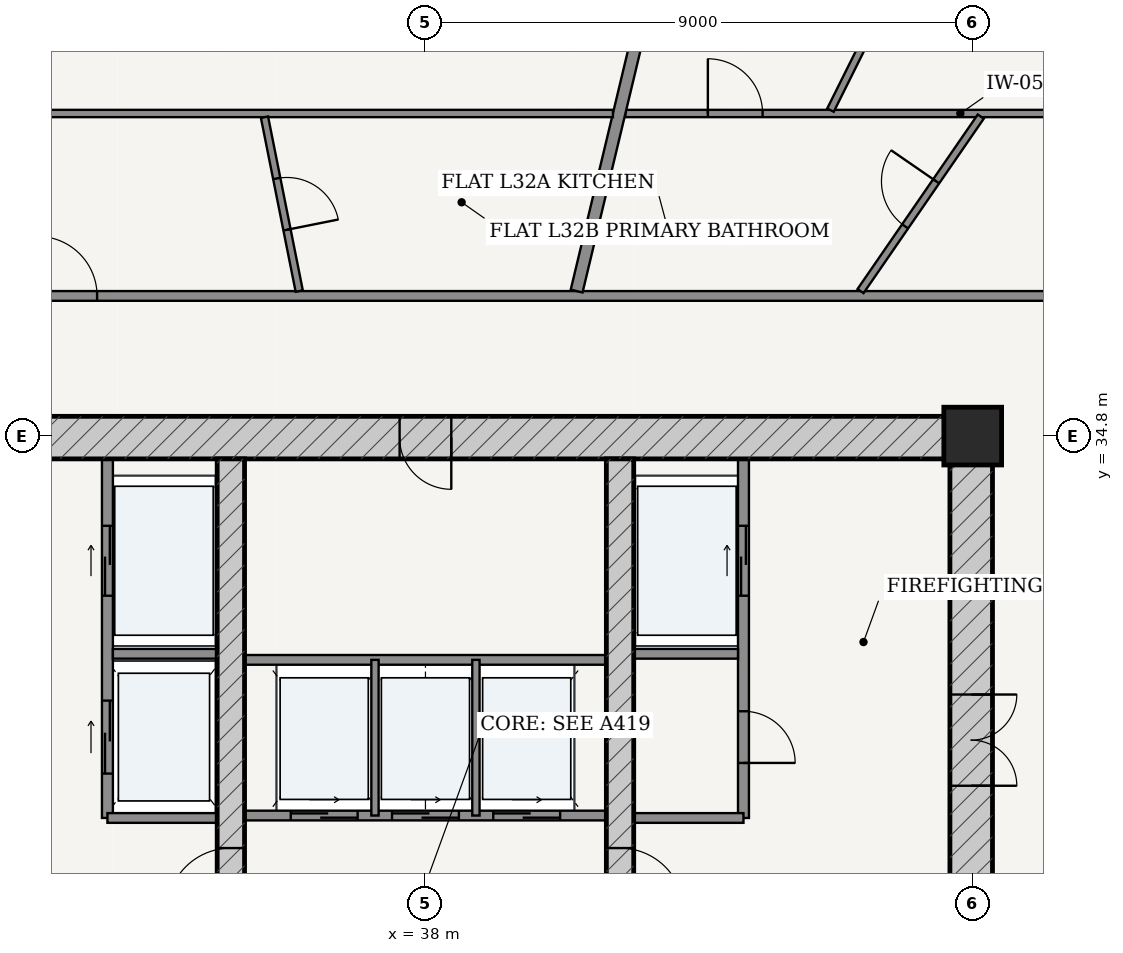
"""IFC4 building model, lengths in metres.
Left out: names, types, materials, properties, quantities, classifications, styles, units other than length and angle.
Written with IfcOpenShell. Run it as: python <this file> out.ifc"""

import sys

from ifc_helpers import new_model, si_unit, direction, frame, frame_2d, origin, origin_2d, place, context, subcontext, project, spatial, rectangle, extrude, source, transform, mapped, element, fill, save


model = new_model("IFC4")
c1 = context("Model", 3, precision=1e-05, world=origin(), true_north=direction((-0.2419218956, 0.970295726276)))
c2 = subcontext(c1, "Body", "Model", "MODEL_VIEW")
j1 = project(units=[si_unit("LENGTHUNIT", "METRE"), si_unit("PLANEANGLEUNIT", "RADIAN")], contexts=[c1])
p1 = place(None, origin())
s1 = spatial("IfcSite", under=j1, at=p1, CompositionType="ELEMENT")
p2 = place(p1, origin())
s2 = spatial("IfcBuilding", under=s1, at=p2, CompositionType="ELEMENT")
p3 = place(p2, frame((0.0, 0.0, 123.0)))
s3 = spatial("IfcBuildingStorey", under=s2, at=p3, CompositionType="ELEMENT", Elevation=123.0)
p4 = place(p3, frame((47.0, 34.8, 0.0), z_axis=(0.0, 0.0, 1.0), x_axis=(1.0, 0.0, 0.0)))
e1 = element("IfcColumn", 1, at=p4, inside=s3, PredefinedType="COLUMN", context=c2, shape_type="SweptSolid", body=[
    extrude(rectangle(XDim=0.95, YDim=0.95, at=origin_2d()), origin(), (0.0, 0.0, 1.0), 3.6),
])
p5 = place(p3, frame((28.675, 34.775, 0.0), z_axis=(0.0, 0.0, 1.0), x_axis=(1.0, 0.0, 0.0)))
e2 = element("IfcWall", 2, at=p5, inside=s3, PredefinedType="SHEAR", context=c2, shape_type="SweptSolid", body=[
    extrude(rectangle(XDim=18.65, YDim=0.7, at=frame_2d((9.325, 0.0))), origin(), (0.0, 0.0, 1.0), 3.325),
])
p6 = place(p5, frame((8.9, 0.0, 0.0)))
e3 = element("IfcOpeningElement", 3, at=p6, cuts=e2, PredefinedType="OPENING", context=c2, shape_type="SweptSolid", body=[
    extrude(rectangle(XDim=0.85, YDim=2.1, at=frame_2d((0.425, 1.05))), frame((0.0, 0.36, 0.0), z_axis=(0.0, -1.0, 0.0), x_axis=(1.0, 0.0, 0.0)), (0.0, 0.0, 1.0), 0.72),
])
p7 = place(p3, frame((46.975, 19.175, 0.0), z_axis=(0.0, 0.0, 1.0), x_axis=(0.0, 1.0, 0.0)))
e4 = element("IfcWall", 4, at=p7, inside=s3, PredefinedType="SHEAR", context=c2, shape_type="SweptSolid", body=[
    extrude(rectangle(XDim=15.25, YDim=0.7, at=frame_2d((7.625, 0.0))), origin(), (0.0, 0.0, 1.0), 3.325),
])
p8 = place(p7, frame((9.875, 0.0, 0.0)))
e5 = element("IfcOpeningElement", 5, at=p8, cuts=e4, PredefinedType="OPENING", context=c2, shape_type="SweptSolid", body=[
    extrude(rectangle(XDim=1.5, YDim=2.2, at=frame_2d((0.75, 1.1))), frame((0.0, 0.36, 0.0), z_axis=(0.0, -1.0, 0.0), x_axis=(1.0, 0.0, 0.0)), (0.0, 0.0, 1.0), 0.72),
])
p9 = place(p3, frame((34.8, 19.175, 0.0), z_axis=(0.0, 0.0, 1.0), x_axis=(0.0, 1.0, 0.0)))
e6 = element("IfcWall", 6, at=p9, inside=s3, PredefinedType="SHEAR", context=c2, shape_type="SweptSolid", body=[
    extrude(rectangle(XDim=15.25, YDim=0.45, at=frame_2d((7.625, 0.0))), origin(), (0.0, 0.0, 1.0), 3.325),
])
p10 = place(p9, frame((7.8, 0.0, 0.0)))
e7 = element("IfcOpeningElement", 7, at=p10, cuts=e6, PredefinedType="OPENING", context=c2, shape_type="SweptSolid", body=[
    extrude(rectangle(XDim=1.05, YDim=2.15, at=frame_2d((0.525, 1.075))), frame((0.0, 0.235, 0.0), z_axis=(0.0, -1.0, 0.0), x_axis=(1.0, 0.0, 0.0)), (0.0, 0.0, 1.0), 0.47),
])
p11 = place(p3, frame((41.2, 19.175, 0.0), z_axis=(0.0, 0.0, 1.0), x_axis=(0.0, 1.0, 0.0)))
e8 = element("IfcWall", 8, at=p11, inside=s3, PredefinedType="SHEAR", context=c2, shape_type="SweptSolid", body=[
    extrude(rectangle(XDim=15.25, YDim=0.45, at=frame_2d((7.625, 0.0))), origin(), (0.0, 0.0, 1.0), 3.325),
])
p12 = place(p11, frame((7.8, 0.0, 0.0)))
e9 = element("IfcOpeningElement", 9, at=p12, cuts=e8, PredefinedType="OPENING", context=c2, shape_type="SweptSolid", body=[
    extrude(rectangle(XDim=1.05, YDim=2.15, at=frame_2d((0.525, 1.075))), frame((0.0, 0.235, 0.0), z_axis=(0.0, -1.0, 0.0), x_axis=(1.0, 0.0, 0.0)), (0.0, 0.0, 1.0), 0.47),
])
p13 = place(p3, frame((32.77, 28.52, 0.0), z_axis=(0.0, 0.0, 1.0), x_axis=(0.0, 1.0, 0.0)))
e10 = element("IfcWall", 10, at=p13, inside=s3, PredefinedType="PARTITIONING", context=c2, shape_type="SweptSolid", body=[
    extrude(rectangle(XDim=5.905, YDim=0.18, at=frame_2d((2.953, 0.0))), origin(), (0.0, 0.0, 1.0), 3.325),
])
p14 = place(p13, frame((3.655, 0.0, 0.0)))
e11 = element("IfcOpeningElement", 11, at=p14, cuts=e10, PredefinedType="OPENING", context=c2, shape_type="SweptSolid", body=[
    extrude(rectangle(XDim=1.15, YDim=2.2, at=frame_2d((0.575, 1.1))), frame((0.0, 0.1, 0.0), z_axis=(0.0, -1.0, 0.0), x_axis=(1.0, 0.0, 0.0)), (0.0, 0.0, 1.0), 0.2),
])
p15 = place(p13, frame((0.73, 0.0, 0.0)))
e12 = element("IfcOpeningElement", 12, at=p15, cuts=e10, PredefinedType="OPENING", context=c2, shape_type="SweptSolid", body=[
    extrude(rectangle(XDim=1.2, YDim=2.25, at=frame_2d((0.6, 1.125))), frame((0.0, 0.1, 0.0), z_axis=(0.0, -1.0, 0.0), x_axis=(1.0, 0.0, 0.0)), (0.0, 0.0, 1.0), 0.2),
])
p16 = place(p3, frame((32.86, 31.22, 0.0), z_axis=(0.0, 0.0, 1.0), x_axis=(1.0, 0.0, 0.0)))
e13 = element("IfcWall", 13, at=p16, inside=s3, PredefinedType="PARTITIONING", context=c2, shape_type="SweptSolid", body=[
    extrude(rectangle(XDim=1.715, YDim=0.16, at=frame_2d((0.857, 0.0))), origin(), (0.0, 0.0, 1.0), 3.325),
])
p17 = place(p3, frame((32.77, 28.52, 0.0), z_axis=(0.0, 0.0, 1.0), x_axis=(1.0, 0.0, 0.0)))
e14 = element("IfcWall", 14, at=p17, inside=s3, PredefinedType="PARTITIONING", context=c2, shape_type="SweptSolid", body=[
    extrude(rectangle(XDim=1.805, YDim=0.16, at=frame_2d((0.902, 0.0))), origin(), (0.0, 0.0, 1.0), 3.325),
])
p18 = place(p3, frame((43.23, 28.52, 0.0), z_axis=(0.0, 0.0, 1.0), x_axis=(0.0, 1.0, 0.0)))
e15 = element("IfcWall", 15, at=p18, inside=s3, PredefinedType="PARTITIONING", context=c2, shape_type="SweptSolid", body=[
    extrude(rectangle(XDim=5.905, YDim=0.18, at=frame_2d((2.953, 0.0))), origin(), (0.0, 0.0, 1.0), 3.325),
])
p19 = place(p18, frame((0.905, 0.0, 0.0)))
e16 = element("IfcOpeningElement", 16, at=p19, cuts=e15, PredefinedType="OPENING", context=c2, shape_type="SweptSolid", body=[
    extrude(rectangle(XDim=0.85, YDim=2.1, at=frame_2d((0.425, 1.05))), frame((0.0, 0.1, 0.0), z_axis=(0.0, -1.0, 0.0), x_axis=(1.0, 0.0, 0.0)), (0.0, 0.0, 1.0), 0.2),
])
p20 = place(p18, frame((3.655, 0.0, 0.0)))
e17 = element("IfcOpeningElement", 17, at=p20, cuts=e15, PredefinedType="OPENING", context=c2, shape_type="SweptSolid", body=[
    extrude(rectangle(XDim=1.15, YDim=2.2, at=frame_2d((0.575, 1.1))), frame((0.0, 0.1, 0.0), z_axis=(0.0, -1.0, 0.0), x_axis=(1.0, 0.0, 0.0)), (0.0, 0.0, 1.0), 0.2),
])
p21 = place(p3, frame((41.425, 31.22, 0.0), z_axis=(0.0, 0.0, 1.0), x_axis=(1.0, 0.0, 0.0)))
e18 = element("IfcWall", 18, at=p21, inside=s3, PredefinedType="PARTITIONING", context=c2, shape_type="SweptSolid", body=[
    extrude(rectangle(XDim=1.715, YDim=0.16, at=frame_2d((0.857, 0.0))), origin(), (0.0, 0.0, 1.0), 3.325),
])
p22 = place(p3, frame((41.425, 28.52, 0.0), z_axis=(0.0, 0.0, 1.0), x_axis=(1.0, 0.0, 0.0)))
e19 = element("IfcWall", 19, at=p22, inside=s3, PredefinedType="PARTITIONING", context=c2, shape_type="SweptSolid", body=[
    extrude(rectangle(XDim=1.805, YDim=0.16, at=frame_2d((0.902, 0.0))), origin(), (0.0, 0.0, 1.0), 3.325),
])
p23 = place(p3, frame((35.025, 28.56, 0.0), z_axis=(0.0, 0.0, 1.0), x_axis=(1.0, 0.0, 0.0)))
e20 = element("IfcWall", 20, at=p23, inside=s3, PredefinedType="PARTITIONING", context=c2, shape_type="SweptSolid", body=[
    extrude(rectangle(XDim=5.95, YDim=0.16, at=frame_2d((2.975, 0.0))), origin(), (0.0, 0.0, 1.0), 3.325),
])
p24 = place(p23, frame((0.76, 0.0, 0.0)))
e21 = element("IfcOpeningElement", 21, at=p24, cuts=e20, PredefinedType="OPENING", context=c2, shape_type="SweptSolid", body=[
    extrude(rectangle(XDim=1.1, YDim=2.2, at=frame_2d((0.55, 1.1))), frame((0.0, 0.09, 0.0), z_axis=(0.0, -1.0, 0.0), x_axis=(1.0, 0.0, 0.0)), (0.0, 0.0, 1.0), 0.18),
])
p25 = place(p23, frame((2.425, 0.0, 0.0)))
e22 = element("IfcOpeningElement", 22, at=p25, cuts=e20, PredefinedType="OPENING", context=c2, shape_type="SweptSolid", body=[
    extrude(rectangle(XDim=1.1, YDim=2.2, at=frame_2d((0.55, 1.1))), frame((0.0, 0.09, 0.0), z_axis=(0.0, -1.0, 0.0), x_axis=(1.0, 0.0, 0.0)), (0.0, 0.0, 1.0), 0.18),
])
p26 = place(p23, frame((4.09, 0.0, 0.0)))
e23 = element("IfcOpeningElement", 23, at=p26, cuts=e20, PredefinedType="OPENING", context=c2, shape_type="SweptSolid", body=[
    extrude(rectangle(XDim=1.1, YDim=2.2, at=frame_2d((0.55, 1.1))), frame((0.0, 0.09, 0.0), z_axis=(0.0, -1.0, 0.0), x_axis=(1.0, 0.0, 0.0)), (0.0, 0.0, 1.0), 0.18),
])
p27 = place(p3, frame((35.025, 31.12, 0.0), z_axis=(0.0, 0.0, 1.0), x_axis=(1.0, 0.0, 0.0)))
e24 = element("IfcWall", 24, at=p27, inside=s3, PredefinedType="PARTITIONING", context=c2, shape_type="SweptSolid", body=[
    extrude(rectangle(XDim=5.95, YDim=0.16, at=frame_2d((2.975, 0.0))), origin(), (0.0, 0.0, 1.0), 3.325),
])
for number, where, z_axis, x_axis in (
    (25, (37.17, 28.56, 0.0), (0.0, 0.0, 1.0), (0.0, 1.0, 0.0)),
    (26, (38.83, 28.56, 0.0), (0.0, 0.0, 1.0), (0.0, 1.0, 0.0)),
):
    element("IfcWall", number, at=place(p3, frame(where, z_axis=z_axis, x_axis=x_axis)), inside=s3, PredefinedType="PARTITIONING", context=c2, shape_type="SweptSolid", body=[
        extrude(rectangle(XDim=2.56, YDim=0.12, at=frame_2d((1.28, 0.0))), origin(), (0.0, 0.0, 1.0), 3.325),
    ])
p28 = place(p3, frame((26.695, 37.105, 0.0), z_axis=(0.0, 0.0, 1.0), x_axis=(1.0, 0.0, 0.0)))
e27 = element("IfcWall", 27, at=p28, inside=s3, PredefinedType="PARTITIONING", context=c2, shape_type="SweptSolid", body=[
    extrude(rectangle(XDim=22.61, YDim=0.16, at=frame_2d((11.305, 0.0))), origin(), (0.0, 0.0, 1.0), 2.767),
])
p29 = place(p28, frame((4.925, 0.0, 0.0)))
e28 = element("IfcOpeningElement", 28, at=p29, cuts=e27, PredefinedType="OPENING", context=c2, shape_type="SweptSolid", body=[
    extrude(rectangle(XDim=0.98, YDim=2.2, at=frame_2d((0.49, 1.1))), frame((0.0, 0.09, 0.0), z_axis=(0.0, -1.0, 0.0), x_axis=(1.0, 0.0, 0.0)), (0.0, 0.0, 1.0), 0.18),
])
p30 = place(p3, frame((41.287, 40.105, 0.0), z_axis=(0.0, 0.0, 1.0), x_axis=(1.0, 0.0, 0.0)))
e29 = element("IfcWall", 29, at=p30, inside=s3, PredefinedType="PARTITIONING", context=c2, shape_type="SweptSolid", body=[
    extrude(rectangle(XDim=11.018, YDim=0.12, at=frame_2d((5.509, 0.0))), origin(), (0.0, 0.0, 1.0), 2.767),
])
p31 = place(p30, frame((1.357, 0.0, 0.0)))
e30 = element("IfcOpeningElement", 30, at=p31, cuts=e29, PredefinedType="OPENING", context=c2, shape_type="SweptSolid", body=[
    extrude(rectangle(XDim=0.9, YDim=2.15, at=frame_2d((0.45, 1.075))), frame((0.0, 0.07, 0.0), z_axis=(0.0, -1.0, 0.0), x_axis=(1.0, 0.0, 0.0)), (0.0, 0.0, 1.0), 0.14),
])
p32 = place(p3, frame((44.661, 40.16, 0.0), z_axis=(0.0, 0.0, 1.0), x_axis=(0.446177198157, 0.894944639542, 0.0)))
e31 = element("IfcWall", 31, at=p32, inside=s3, PredefinedType="PARTITIONING", context=c2, shape_type="SweptSolid", body=[
    extrude(rectangle(XDim=7.823, YDim=0.12, at=frame_2d((3.912, 0.0))), origin(), (0.0, 0.0, 1.0), 2.767),
])
p33 = place(p32, frame((3.461, 0.0, 0.0)))
e32 = element("IfcOpeningElement", 32, at=p33, cuts=e31, PredefinedType="OPENING", context=c2, shape_type="SweptSolid", body=[
    extrude(rectangle(XDim=0.9, YDim=2.15, at=frame_2d((0.45, 1.075))), frame((0.0, 0.07, 0.0), z_axis=(0.0, -1.0, 0.0), x_axis=(1.0, 0.0, 0.0)), (0.0, 0.0, 1.0), 0.14),
])
p34 = place(p3, frame((45.155, 37.185, 0.0), z_axis=(0.0, 0.0, 1.0), x_axis=(0.567393940912, 0.82344648631, 0.0)))
e33 = element("IfcWall", 33, at=p34, inside=s3, PredefinedType="PARTITIONING", context=c2, shape_type="SweptSolid", body=[
    extrude(rectangle(XDim=3.484, YDim=0.12, at=frame_2d((1.742, 0.0))), origin(), (0.0, 0.0, 1.0), 3.004),
])
p35 = place(p34, frame((1.292, 0.0, 0.0)))
e34 = element("IfcOpeningElement", 34, at=p35, cuts=e33, PredefinedType="OPENING", context=c2, shape_type="SweptSolid", body=[
    extrude(rectangle(XDim=0.9, YDim=2.15, at=frame_2d((0.45, 1.075))), frame((0.0, 0.07, 0.0), z_axis=(0.0, -1.0, 0.0), x_axis=(1.0, 0.0, 0.0)), (0.0, 0.0, 1.0), 0.14),
])
p36 = place(p3, frame((40.486, 37.185, 0.0), z_axis=(0.0, 0.0, 1.0), x_axis=(0.232834224261, 0.972516438942, 0.0)))
e35 = element("IfcWall", 35, at=p36, inside=s3, PredefinedType="PARTITIONING", context=c2, shape_type="SweptSolid", body=[
    extrude(rectangle(XDim=11.502, YDim=0.2, at=frame_2d((5.751, 0.0))), origin(), (0.0, 0.0, 1.0), 2.767),
])
p37 = place(p3, frame((23.695, 40.105, 0.0), z_axis=(0.0, 0.0, 1.0), x_axis=(1.0, 0.0, 0.0)))
e36 = element("IfcWall", 36, at=p37, inside=s3, PredefinedType="PARTITIONING", context=c2, shape_type="SweptSolid", body=[
    extrude(rectangle(XDim=17.388, YDim=0.12, at=frame_2d((8.694, 0.0))), origin(), (0.0, 0.0, 1.0), 2.767),
])
p38 = place(p37, frame((7.184, 0.0, 0.0)))
e37 = element("IfcOpeningElement", 37, at=p38, cuts=e36, PredefinedType="OPENING", context=c2, shape_type="SweptSolid", body=[
    extrude(rectangle(XDim=0.9, YDim=2.15, at=frame_2d((0.45, 1.075))), frame((0.0, 0.07, 0.0), z_axis=(0.0, -1.0, 0.0), x_axis=(1.0, 0.0, 0.0)), (0.0, 0.0, 1.0), 0.14),
])
p39 = place(p3, frame((35.925, 37.185, 0.0), z_axis=(0.0, 0.0, 1.0), x_axis=(-0.196019518907, 0.980599993987, 0.0)))
e38 = element("IfcWall", 38, at=p39, inside=s3, PredefinedType="PARTITIONING", context=c2, shape_type="SweptSolid", body=[
    extrude(rectangle(XDim=2.916, YDim=0.12, at=frame_2d((1.458, 0.0))), origin(), (0.0, 0.0, 1.0), 3.325),
])
p40 = place(p39, frame((1.028, 0.0, 0.0)))
e39 = element("IfcOpeningElement", 39, at=p40, cuts=e38, PredefinedType="OPENING", context=c2, shape_type="SweptSolid", body=[
    extrude(rectangle(XDim=0.86, YDim=2.15, at=frame_2d((0.43, 1.075))), frame((0.0, 0.07, 0.0), z_axis=(0.0, -1.0, 0.0), x_axis=(1.0, 0.0, 0.0)), (0.0, 0.0, 1.0), 0.14),
])
m1 = source(origin(), c2, "Body", "SweptSolid", [
    extrude(rectangle(XDim=1.5, YDim=2.2, at=frame_2d((0.75, 1.1))), frame((0.0, 0.025, 0.0), z_axis=(0.0, -1.0, 0.0), x_axis=(1.0, 0.0, 0.0)), (0.0, 0.0, 1.0), 0.05),
])
p41 = place(p8, frame((1.5, 0.0, 0.0), z_axis=(0.0, 0.0, 1.0), x_axis=(-1.0, 0.0, 0.0)))
e40 = element("IfcDoor", 40, at=p41, inside=s3, OperationType="DOUBLE_DOOR_SINGLE_SWING", PredefinedType="DOOR", context=c2, shape_type="MappedRepresentation", body=[
    mapped(m1, transform((0.0, 0.0, 0.0), scale=1.0)),
])
fill(e5, e40)
m2 = source(origin(), c2, "Body", "SweptSolid", [
    extrude(rectangle(XDim=1.05, YDim=2.15, at=frame_2d((0.525, 1.075))), frame((0.0, 0.025, 0.0), z_axis=(0.0, -1.0, 0.0), x_axis=(1.0, 0.0, 0.0)), (0.0, 0.0, 1.0), 0.05),
])
p42 = place(p10, origin())
e41 = element("IfcDoor", 41, at=p42, inside=s3, OperationType="SINGLE_SWING_LEFT", PredefinedType="DOOR", context=c2, shape_type="MappedRepresentation", body=[
    mapped(m2, transform((0.0, 0.0, 0.0), scale=1.0)),
])
fill(e7, e41)
p43 = place(p12, frame((1.05, 0.0, 0.0), z_axis=(0.0, 0.0, 1.0), x_axis=(-1.0, 0.0, 0.0)))
e42 = element("IfcDoor", 42, at=p43, inside=s3, OperationType="SINGLE_SWING_RIGHT", PredefinedType="DOOR", context=c2, shape_type="MappedRepresentation", body=[
    mapped(m2, transform((0.0, 0.0, 0.0), scale=1.0)),
])
fill(e9, e42)
m3 = source(origin(), c2, "Body", "SweptSolid", [
    extrude(rectangle(XDim=0.85, YDim=2.1, at=frame_2d((0.425, 1.05))), frame((0.0, 0.025, 0.0), z_axis=(0.0, -1.0, 0.0), x_axis=(1.0, 0.0, 0.0)), (0.0, 0.0, 1.0), 0.05),
])
p44 = place(p19, frame((0.85, 0.0, 0.0), z_axis=(0.0, 0.0, 1.0), x_axis=(-1.0, 0.0, 0.0)))
e43 = element("IfcDoor", 43, at=p44, inside=s3, OperationType="SINGLE_SWING_RIGHT", PredefinedType="DOOR", context=c2, shape_type="MappedRepresentation", body=[
    mapped(m3, transform((0.0, 0.0, 0.0), scale=1.0)),
])
fill(e16, e43)
p45 = place(p6, frame((0.85, 0.0, 0.0), z_axis=(0.0, 0.0, 1.0), x_axis=(-1.0, 0.0, 0.0)))
e44 = element("IfcDoor", 44, at=p45, inside=s3, OperationType="SINGLE_SWING_LEFT", PredefinedType="DOOR", context=c2, shape_type="MappedRepresentation", body=[
    mapped(m3, transform((0.0, 0.0, 0.0), scale=1.0)),
])
fill(e3, e44)
m4 = source(origin(), c2, "Body", "SweptSolid", [
    extrude(rectangle(XDim=1.15, YDim=2.2, at=frame_2d((0.575, 1.1))), frame((0.0, 0.025, 0.0), z_axis=(0.0, -1.0, 0.0), x_axis=(1.0, 0.0, 0.0)), (0.0, 0.0, 1.0), 0.05),
])
p46 = place(p14, origin())
e45 = element("IfcDoor", 45, at=p46, inside=s3, OperationType="DOUBLE_DOOR_SLIDING", PredefinedType="DOOR", context=c2, shape_type="MappedRepresentation", body=[
    mapped(m4, transform((0.0, 0.0, 0.0), scale=1.0)),
])
fill(e11, e45)
p47 = place(p20, origin())
e46 = element("IfcDoor", 46, at=p47, inside=s3, OperationType="DOUBLE_DOOR_SLIDING", PredefinedType="DOOR", context=c2, shape_type="MappedRepresentation", body=[
    mapped(m4, transform((0.0, 0.0, 0.0), scale=1.0)),
])
fill(e17, e46)
m5 = source(origin(), c2, "Body", "SweptSolid", [
    extrude(rectangle(XDim=1.2, YDim=2.25, at=frame_2d((0.6, 1.125))), frame((0.0, 0.025, 0.0), z_axis=(0.0, -1.0, 0.0), x_axis=(1.0, 0.0, 0.0)), (0.0, 0.0, 1.0), 0.05),
])
p48 = place(p15, origin())
e47 = element("IfcDoor", 47, at=p48, inside=s3, OperationType="DOUBLE_DOOR_SLIDING", PredefinedType="DOOR", context=c2, shape_type="MappedRepresentation", body=[
    mapped(m5, transform((0.0, 0.0, 0.0), scale=1.0)),
])
fill(e12, e47)
m6 = source(origin(), c2, "Body", "SweptSolid", [
    extrude(rectangle(XDim=1.1, YDim=2.2, at=frame_2d((0.55, 1.1))), frame((0.0, 0.025, 0.0), z_axis=(0.0, -1.0, 0.0), x_axis=(1.0, 0.0, 0.0)), (0.0, 0.0, 1.0), 0.05),
])
p49 = place(p24, origin())
e48 = element("IfcDoor", 48, at=p49, inside=s3, OperationType="DOUBLE_DOOR_SLIDING", PredefinedType="DOOR", context=c2, shape_type="MappedRepresentation", body=[
    mapped(m6, transform((0.0, 0.0, 0.0), scale=1.0)),
])
fill(e21, e48)
p50 = place(p25, origin())
e49 = element("IfcDoor", 49, at=p50, inside=s3, OperationType="DOUBLE_DOOR_SLIDING", PredefinedType="DOOR", context=c2, shape_type="MappedRepresentation", body=[
    mapped(m6, transform((0.0, 0.0, 0.0), scale=1.0)),
])
fill(e22, e49)
p51 = place(p26, origin())
e50 = element("IfcDoor", 50, at=p51, inside=s3, OperationType="DOUBLE_DOOR_SLIDING", PredefinedType="DOOR", context=c2, shape_type="MappedRepresentation", body=[
    mapped(m6, transform((0.0, 0.0, 0.0), scale=1.0)),
])
fill(e23, e50)
m7 = source(origin(), c2, "Body", "SweptSolid", [
    extrude(rectangle(XDim=0.9, YDim=2.15, at=frame_2d((0.45, 1.075))), frame((0.0, 0.025, 0.0), z_axis=(0.0, -1.0, 0.0), x_axis=(1.0, 0.0, 0.0)), (0.0, 0.0, 1.0), 0.05),
])
p52 = place(p35, origin())
e51 = element("IfcDoor", 51, at=p52, inside=s3, OperationType="SINGLE_SWING_RIGHT", PredefinedType="DOOR", context=c2, shape_type="MappedRepresentation", body=[
    mapped(m7, transform((0.0, 0.0, 0.0), scale=1.0)),
])
fill(e34, e51)
p53 = place(p31, origin())
e52 = element("IfcDoor", 52, at=p53, inside=s3, OperationType="SINGLE_SWING_LEFT", PredefinedType="DOOR", context=c2, shape_type="MappedRepresentation", body=[
    mapped(m7, transform((0.0, 0.0, 0.0), scale=1.0)),
])
fill(e30, e52)
m8 = source(origin(), c2, "Body", "SweptSolid", [
    extrude(rectangle(XDim=0.98, YDim=2.2, at=frame_2d((0.49, 1.1))), frame((0.0, 0.025, 0.0), z_axis=(0.0, -1.0, 0.0), x_axis=(1.0, 0.0, 0.0)), (0.0, 0.0, 1.0), 0.05),
])
p54 = place(p29, origin())
e53 = element("IfcDoor", 53, at=p54, inside=s3, OperationType="SINGLE_SWING_LEFT", PredefinedType="DOOR", context=c2, shape_type="MappedRepresentation", body=[
    mapped(m8, transform((0.0, 0.0, 0.0), scale=1.0)),
])
fill(e28, e53)
m9 = source(origin(), c2, "Body", "SweptSolid", [
    extrude(rectangle(XDim=0.86, YDim=2.15, at=frame_2d((0.43, 1.075))), frame((0.0, 0.025, 0.0), z_axis=(0.0, -1.0, 0.0), x_axis=(1.0, 0.0, 0.0)), (0.0, 0.0, 1.0), 0.05),
])
p55 = place(p40, frame((0.86, 0.0, 0.0), z_axis=(0.0, 0.0, 1.0), x_axis=(-1.0, 0.0, 0.0)))
e54 = element("IfcDoor", 54, at=p55, inside=s3, OperationType="SINGLE_SWING_RIGHT", PredefinedType="DOOR", context=c2, shape_type="MappedRepresentation", body=[
    mapped(m9, transform((0.0, 0.0, 0.0), scale=1.0)),
])
fill(e39, e54)
save(model, sys.argv[1])
